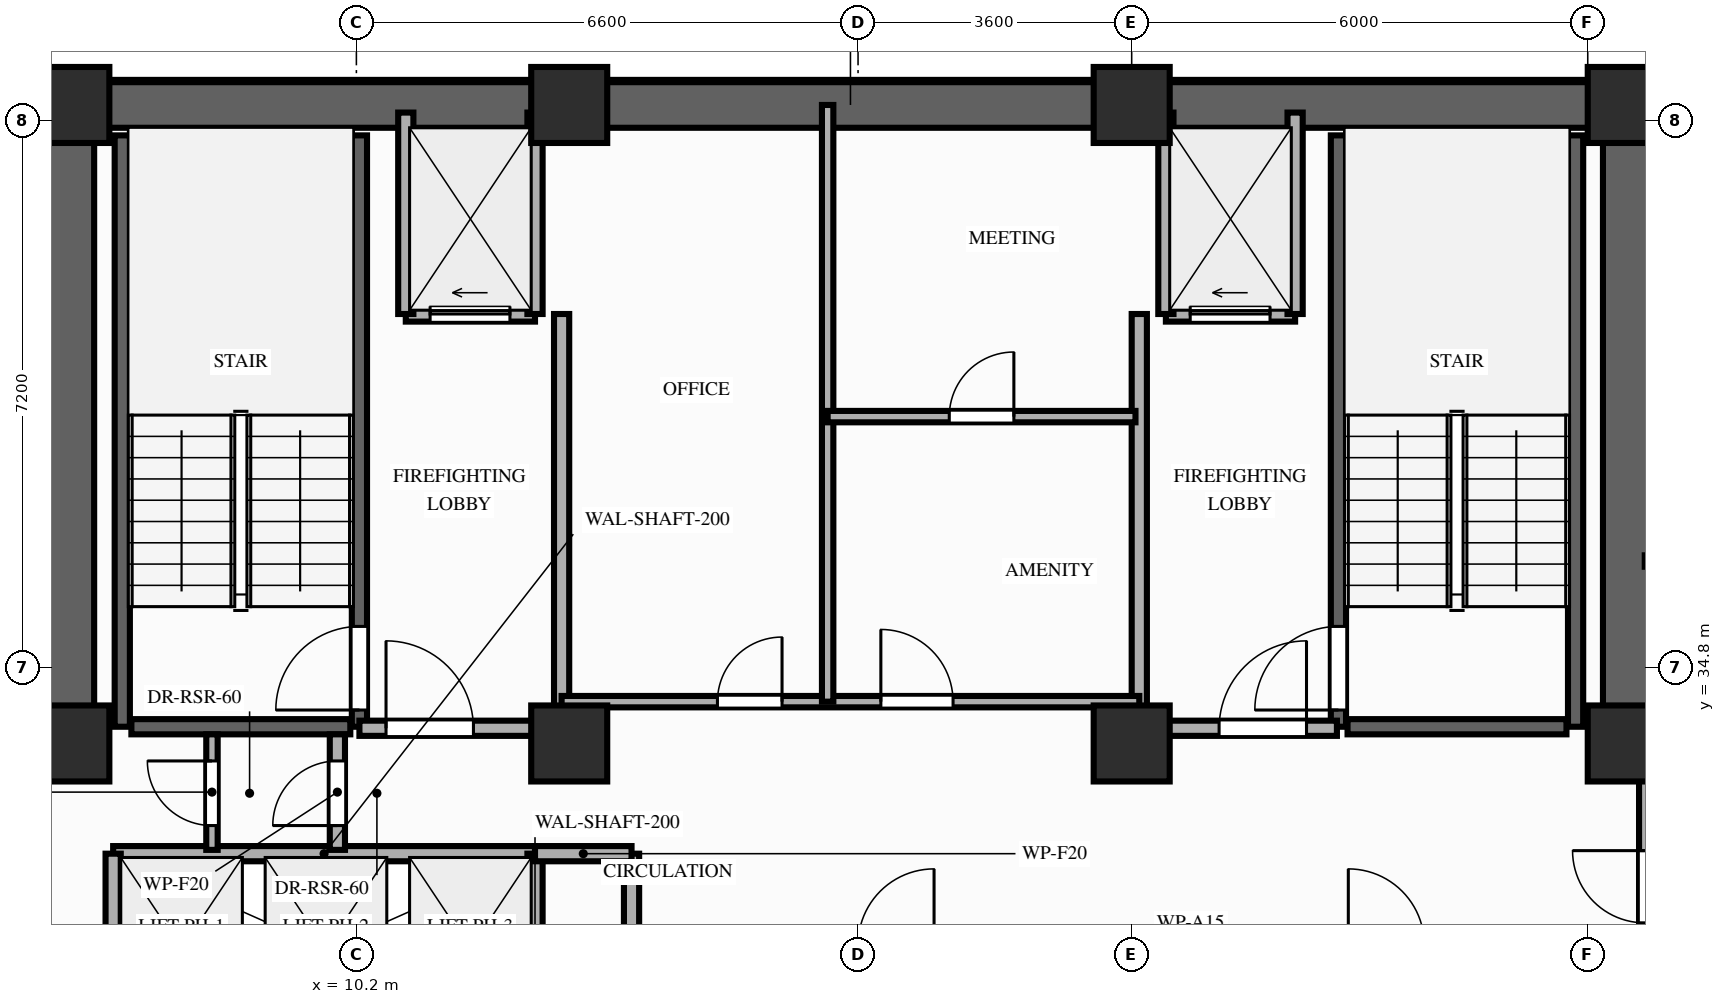
"""IFC4 building model, lengths in metres.
Left out: names, types, materials, properties, quantities, classifications, styles, units other than length and angle.
Written with IfcOpenShell. Run it as: python <this file> out.ifc"""

import sys

from ifc_helpers import new_model, si_unit, direction, frame, frame_2d, origin, origin_2d, place, context, subcontext, project, spatial, rectangle, extrude, element, fill, save


model = new_model("IFC4")
c1 = context("Model", 3, precision=1e-05, world=origin(), true_north=direction((0.0, 1.0)))
c2 = subcontext(c1, "Body", "Model", "MODEL_VIEW")
j1 = project(units=[si_unit("LENGTHUNIT", "METRE"), si_unit("PLANEANGLEUNIT", "RADIAN")], contexts=[c1])
p1 = place(None, origin())
s1 = spatial("IfcSite", under=j1, at=p1, CompositionType="ELEMENT")
p2 = place(p1, origin())
s2 = spatial("IfcBuilding", under=s1, at=p2, CompositionType="ELEMENT")
p3 = place(p2, frame((0.0, 0.0, 163.2)))
s3 = spatial("IfcBuildingStorey", under=s2, at=p3, CompositionType="ELEMENT", Elevation=163.2)
for number, where, z_axis, x_axis in (
    (1, (6.45, 33.8, 0.0), (0.0, 0.0, 1.0), (1.0, 0.0, 0.0)),
    (2, (13.0, 33.8, 0.0), (0.0, 0.0, 1.0), (1.0, 0.0, 0.0)),
    (3, (20.4, 33.8, 0.0), (0.0, 0.0, 1.0), (1.0, 0.0, 0.0)),
    (4, (26.9, 33.8, 0.0), (0.0, 0.0, 1.0), (1.0, 0.0, 0.0)),
    (5, (6.45, 42.2, 0.0), (0.0, 0.0, 1.0), (1.0, 0.0, 0.0)),
    (6, (13.0, 42.2, 0.0), (0.0, 0.0, 1.0), (1.0, 0.0, 0.0)),
    (7, (20.4, 42.2, 0.0), (0.0, 0.0, 1.0), (1.0, 0.0, 0.0)),
    (8, (26.9, 42.2, 0.0), (0.0, 0.0, 1.0), (1.0, 0.0, 0.0)),
):
    element("IfcColumn", number, at=place(p3, frame(where, z_axis=z_axis, x_axis=x_axis)), inside=s3, PredefinedType="COLUMN", context=c2, shape_type="SweptSolid", body=[
        extrude(rectangle(XDim=1.0, YDim=1.0, at=origin_2d()), origin(), (0.0, 0.0, 1.0), 3.2),
    ])
p4 = place(p3, frame((6.45, 42.2, 0.0), z_axis=(0.0, 0.0, 1.0), x_axis=(1.0, 0.0, 0.0)))
e9 = element("IfcWall", 9, at=p4, inside=s3, PredefinedType="SHEAR", context=c2, shape_type="SweptSolid", body=[
    extrude(rectangle(XDim=20.45, YDim=0.6, at=frame_2d((10.225, 0.0))), origin(), (0.0, 0.0, 1.0), 3.02),
])
for number, where, z_axis, x_axis in (
    (10, (6.45, 33.8, 0.0), (0.0, 0.0, 1.0), (0.0, 1.0, 0.0)),
    (11, (26.9, 33.8, 0.0), (0.0, 0.0, 1.0), (0.0, 1.0, 0.0)),
):
    element("IfcWall", number, at=place(p3, frame(where, z_axis=z_axis, x_axis=x_axis)), inside=s3, PredefinedType="SHEAR", context=c2, shape_type="SweptSolid", body=[
        extrude(rectangle(XDim=7.95, YDim=0.6, at=frame_2d((3.975, 0.0))), origin(), (0.0, 0.0, 1.0), 3.02),
    ])
p5 = place(p3, frame((7.12, 34.02, 0.0), z_axis=(0.0, 0.0, 1.0), x_axis=(0.0, 1.0, 0.0)))
e12 = element("IfcWall", 12, at=p5, inside=s3, PredefinedType="SHEAR", context=c2, shape_type="SweptSolid", body=[
    extrude(rectangle(XDim=7.78, YDim=0.2, at=frame_2d((3.89, 0.0))), origin(), (0.0, 0.0, 1.0), 3.02),
])
p6 = place(p3, frame((10.24, 34.02, 0.0), z_axis=(0.0, 0.0, 1.0), x_axis=(0.0, 1.0, 0.0)))
e13 = element("IfcWall", 13, at=p6, inside=s3, PredefinedType="SHEAR", context=c2, shape_type="SweptSolid", body=[
    extrude(rectangle(XDim=7.78, YDim=0.2, at=frame_2d((3.89, 0.0))), origin(), (0.0, 0.0, 1.0), 3.02),
])
p7 = place(p6, frame((0.22, 0.0, 0.0)))
e14 = element("IfcOpeningElement", 14, at=p7, cuts=e13, PredefinedType="OPENING", context=c2, shape_type="SweptSolid", body=[
    extrude(rectangle(XDim=1.1, YDim=2.15, at=frame_2d((0.55, 1.075))), frame((0.0, 0.11, 0.0), z_axis=(0.0, -1.0, 0.0), x_axis=(1.0, 0.0, 0.0)), (0.0, 0.0, 1.0), 0.22),
])
p8 = place(p3, frame((7.24, 34.02, 0.0), z_axis=(0.0, 0.0, 1.0), x_axis=(1.0, 0.0, 0.0)))
e15 = element("IfcWall", 15, at=p8, inside=s3, PredefinedType="SHEAR", context=c2, shape_type="SweptSolid", body=[
    extrude(rectangle(XDim=2.88, YDim=0.2, at=frame_2d((1.44, 0.0))), origin(), (0.0, 0.0, 1.0), 3.02),
])
p9 = place(p3, frame((23.12, 34.02, 0.0), z_axis=(0.0, 0.0, 1.0), x_axis=(0.0, 1.0, 0.0)))
e16 = element("IfcWall", 16, at=p9, inside=s3, PredefinedType="SHEAR", context=c2, shape_type="SweptSolid", body=[
    extrude(rectangle(XDim=7.78, YDim=0.2, at=frame_2d((3.89, 0.0))), origin(), (0.0, 0.0, 1.0), 3.02),
])
p10 = place(p9, frame((0.22, 0.0, 0.0)))
e17 = element("IfcOpeningElement", 17, at=p10, cuts=e16, PredefinedType="OPENING", context=c2, shape_type="SweptSolid", body=[
    extrude(rectangle(XDim=1.1, YDim=2.15, at=frame_2d((0.55, 1.075))), frame((0.0, 0.11, 0.0), z_axis=(0.0, -1.0, 0.0), x_axis=(1.0, 0.0, 0.0)), (0.0, 0.0, 1.0), 0.22),
])
p11 = place(p3, frame((26.24, 34.02, 0.0), z_axis=(0.0, 0.0, 1.0), x_axis=(0.0, 1.0, 0.0)))
e18 = element("IfcWall", 18, at=p11, inside=s3, PredefinedType="SHEAR", context=c2, shape_type="SweptSolid", body=[
    extrude(rectangle(XDim=7.78, YDim=0.2, at=frame_2d((3.89, 0.0))), origin(), (0.0, 0.0, 1.0), 3.02),
])
p12 = place(p3, frame((23.24, 34.02, 0.0), z_axis=(0.0, 0.0, 1.0), x_axis=(1.0, 0.0, 0.0)))
e19 = element("IfcWall", 19, at=p12, inside=s3, PredefinedType="SHEAR", context=c2, shape_type="SweptSolid", body=[
    extrude(rectangle(XDim=2.88, YDim=0.2, at=frame_2d((1.44, 0.0))), origin(), (0.0, 0.0, 1.0), 3.02),
])
p13 = place(p3, frame((7.0, 32.35, 0.0), z_axis=(0.0, 0.0, 1.0), x_axis=(1.0, 0.0, 0.0)))
e20 = element("IfcWall", 20, at=p13, inside=s3, PredefinedType="MOVABLE", context=c2, shape_type="SweptSolid", body=[
    extrude(rectangle(XDim=5.55, YDim=0.2, at=frame_2d((2.775, 0.0))), origin(), (0.0, 0.0, 1.0), 3.02),
])
for number, where, z_axis, x_axis in (
    (21, (7.0, 29.85, 0.0), (0.0, 0.0, 1.0), (0.0, 1.0, 0.0)),
    (22, (12.55, 29.85, 0.0), (0.0, 0.0, 1.0), (0.0, 1.0, 0.0)),
):
    element("IfcWall", number, at=place(p3, frame(where, z_axis=z_axis, x_axis=x_axis)), inside=s3, PredefinedType="MOVABLE", context=c2, shape_type="SweptSolid", body=[
        extrude(rectangle(XDim=2.5, YDim=0.2, at=frame_2d((1.25, 0.0))), origin(), (0.0, 0.0, 1.0), 3.02),
    ])
p14 = place(p3, frame((10.85, 39.45, 0.0), z_axis=(0.0, 0.0, 1.0), x_axis=(1.0, 0.0, 0.0)))
e23 = element("IfcWall", 23, at=p14, inside=s3, PredefinedType="MOVABLE", context=c2, shape_type="SweptSolid", body=[
    extrude(rectangle(XDim=1.7, YDim=0.2, at=frame_2d((0.85, 0.0))), origin(), (0.0, 0.0, 1.0), 3.02),
])
p15 = place(p14, frame((0.32, 0.0, 0.0)))
e24 = element("IfcOpeningElement", 24, at=p15, cuts=e23, PredefinedType="OPENING", context=c2, shape_type="SweptSolid", body=[
    extrude(rectangle(XDim=1.05, YDim=2.15, at=frame_2d((0.525, 1.075))), frame((0.0, 0.11, 0.0), z_axis=(0.0, -1.0, 0.0), x_axis=(1.0, 0.0, 0.0)), (0.0, 0.0, 1.0), 0.22),
])
p16 = place(p3, frame((20.85, 39.45, 0.0), z_axis=(0.0, 0.0, 1.0), x_axis=(1.0, 0.0, 0.0)))
e25 = element("IfcWall", 25, at=p16, inside=s3, PredefinedType="MOVABLE", context=c2, shape_type="SweptSolid", body=[
    extrude(rectangle(XDim=1.7, YDim=0.2, at=frame_2d((0.85, 0.0))), origin(), (0.0, 0.0, 1.0), 3.02),
])
p17 = place(p16, frame((0.32, 0.0, 0.0)))
e26 = element("IfcOpeningElement", 26, at=p17, cuts=e25, PredefinedType="OPENING", context=c2, shape_type="SweptSolid", body=[
    extrude(rectangle(XDim=1.05, YDim=2.15, at=frame_2d((0.525, 1.075))), frame((0.0, 0.11, 0.0), z_axis=(0.0, -1.0, 0.0), x_axis=(1.0, 0.0, 0.0)), (0.0, 0.0, 1.0), 0.22),
])
for number, where, z_axis, x_axis in (
    (27, (10.85, 39.45, 0.0), (0.0, 0.0, 1.0), (0.0, 1.0, 0.0)),
    (28, (12.55, 39.45, 0.0), (0.0, 0.0, 1.0), (0.0, 1.0, 0.0)),
):
    element("IfcWall", number, at=place(p3, frame(where, z_axis=z_axis, x_axis=x_axis)), inside=s3, PredefinedType="MOVABLE", context=c2, shape_type="SweptSolid", body=[
        extrude(rectangle(XDim=2.65, YDim=0.2, at=frame_2d((1.325, 0.0))), origin(), (0.0, 0.0, 1.0), 2.45),
    ])
p18 = place(p3, frame((12.9, 34.0, 0.0), z_axis=(0.0, 0.0, 1.0), x_axis=(0.0, 1.0, 0.0)))
e29 = element("IfcWall", 29, at=p18, inside=s3, PredefinedType="PARTITIONING", context=c2, shape_type="SweptSolid", body=[
    extrude(rectangle(XDim=5.45, YDim=0.2, at=frame_2d((2.725, 0.0))), origin(), (0.0, 0.0, 1.0), 2.45),
])
p19 = place(p3, frame((10.24, 34.0, 0.0), z_axis=(0.0, 0.0, 1.0), x_axis=(1.0, 0.0, 0.0)))
e30 = element("IfcWall", 30, at=p19, inside=s3, PredefinedType="PARTITIONING", context=c2, shape_type="SweptSolid", body=[
    extrude(rectangle(XDim=2.66, YDim=0.2, at=frame_2d((1.33, 0.0))), origin(), (0.0, 0.0, 1.0), 2.45),
])
p20 = place(p19, frame((0.35, 0.0, 0.0)))
e31 = element("IfcOpeningElement", 31, at=p20, cuts=e30, PredefinedType="OPENING", context=c2, shape_type="SweptSolid", body=[
    extrude(rectangle(XDim=1.15, YDim=2.15, at=frame_2d((0.575, 1.075))), frame((0.0, 0.11, 0.0), z_axis=(0.0, -1.0, 0.0), x_axis=(1.0, 0.0, 0.0)), (0.0, 0.0, 1.0), 0.22),
])
for number, where, z_axis, x_axis in (
    (32, (20.85, 39.45, 0.0), (0.0, 0.0, 1.0), (0.0, 1.0, 0.0)),
    (33, (22.55, 39.45, 0.0), (0.0, 0.0, 1.0), (0.0, 1.0, 0.0)),
):
    element("IfcWall", number, at=place(p3, frame(where, z_axis=z_axis, x_axis=x_axis)), inside=s3, PredefinedType="MOVABLE", context=c2, shape_type="SweptSolid", body=[
        extrude(rectangle(XDim=2.65, YDim=0.2, at=frame_2d((1.325, 0.0))), origin(), (0.0, 0.0, 1.0), 2.45),
    ])
p21 = place(p3, frame((20.5, 34.0, 0.0), z_axis=(0.0, 0.0, 1.0), x_axis=(0.0, 1.0, 0.0)))
e34 = element("IfcWall", 34, at=p21, inside=s3, PredefinedType="PARTITIONING", context=c2, shape_type="SweptSolid", body=[
    extrude(rectangle(XDim=5.45, YDim=0.2, at=frame_2d((2.725, 0.0))), origin(), (0.0, 0.0, 1.0), 2.45),
])
p22 = place(p3, frame((20.5, 34.0, 0.0), z_axis=(0.0, 0.0, 1.0), x_axis=(1.0, 0.0, 0.0)))
e35 = element("IfcWall", 35, at=p22, inside=s3, PredefinedType="PARTITIONING", context=c2, shape_type="SweptSolid", body=[
    extrude(rectangle(XDim=2.6, YDim=0.2, at=frame_2d((1.3, 0.0))), origin(), (0.0, 0.0, 1.0), 2.45),
])
p23 = place(p22, frame((1.05, 0.0, 0.0)))
e36 = element("IfcOpeningElement", 36, at=p23, cuts=e35, PredefinedType="OPENING", context=c2, shape_type="SweptSolid", body=[
    extrude(rectangle(XDim=1.15, YDim=2.15, at=frame_2d((0.575, 1.075))), frame((0.0, 0.11, 0.0), z_axis=(0.0, -1.0, 0.0), x_axis=(1.0, 0.0, 0.0)), (0.0, 0.0, 1.0), 0.22),
])
p24 = place(p3, frame((9.95, 32.4, 0.0), z_axis=(0.0, 0.0, 1.0), x_axis=(0.0, 1.0, 0.0)))
e37 = element("IfcWall", 37, at=p24, inside=s3, PredefinedType="PARTITIONING", context=c2, shape_type="SweptSolid", body=[
    extrude(rectangle(XDim=1.52, YDim=0.2, at=frame_2d((0.76, 0.0))), origin(), (0.0, 0.0, 1.0), 2.45),
])
p25 = place(p24, frame((0.32, 0.0, 0.0)))
e38 = element("IfcOpeningElement", 38, at=p25, cuts=e37, PredefinedType="OPENING", context=c2, shape_type="SweptSolid", body=[
    extrude(rectangle(XDim=0.85, YDim=2.05, at=frame_2d((0.425, 1.025))), frame((0.0, 0.11, 0.0), z_axis=(0.0, -1.0, 0.0), x_axis=(1.0, 0.0, 0.0)), (0.0, 0.0, 1.0), 0.22),
])
p26 = place(p3, frame((8.3, 32.4, 0.0), z_axis=(0.0, 0.0, 1.0), x_axis=(0.0, 1.0, 0.0)))
e39 = element("IfcWall", 39, at=p26, inside=s3, PredefinedType="PARTITIONING", context=c2, shape_type="SweptSolid", body=[
    extrude(rectangle(XDim=1.52, YDim=0.15, at=frame_2d((0.76, 0.0))), origin(), (0.0, 0.0, 1.0), 2.45),
])
p27 = place(p26, frame((0.32, 0.0, 0.0)))
e40 = element("IfcOpeningElement", 40, at=p27, cuts=e39, PredefinedType="OPENING", context=c2, shape_type="SweptSolid", body=[
    extrude(rectangle(XDim=0.85, YDim=2.05, at=frame_2d((0.425, 1.025))), frame((0.0, 0.085, 0.0), z_axis=(0.0, -1.0, 0.0), x_axis=(1.0, 0.0, 0.0)), (0.0, 0.0, 1.0), 0.17),
])
p28 = place(p3, frame((13.82, 29.85, 0.0), z_axis=(0.0, 0.0, 1.0), x_axis=(0.0, 1.0, 0.0)))
e41 = element("IfcWall", 41, at=p28, inside=s3, PredefinedType="PARTITIONING", context=c2, shape_type="SweptSolid", body=[
    extrude(rectangle(XDim=2.5, YDim=0.2, at=frame_2d((1.25, 0.0))), origin(), (0.0, 0.0, 1.0), 3.02),
])
p29 = place(p3, frame((12.55, 32.35, 0.0), z_axis=(0.0, 0.0, 1.0), x_axis=(1.0, 0.0, 0.0)))
e42 = element("IfcWall", 42, at=p29, inside=s3, PredefinedType="PARTITIONING", context=c2, shape_type="SweptSolid", body=[
    extrude(rectangle(XDim=1.27, YDim=0.2, at=frame_2d((0.635, 0.0))), origin(), (0.0, 0.0, 1.0), 3.02),
])
p30 = place(p3, frame((12.9, 34.35, 0.0), z_axis=(0.0, 0.0, 1.0), x_axis=(1.0, 0.0, 0.0)))
e43 = element("IfcWall", 43, at=p30, inside=s3, PredefinedType="PARTITIONING", context=c2, shape_type="SweptSolid", body=[
    extrude(rectangle(XDim=7.6, YDim=0.15, at=frame_2d((3.8, 0.0))), origin(), (0.0, 0.0, 1.0), 3.02),
])
p31 = place(p30, frame((2.05, 0.0, 0.0)))
e44 = element("IfcOpeningElement", 44, at=p31, cuts=e43, PredefinedType="OPENING", context=c2, shape_type="SweptSolid", body=[
    extrude(rectangle(XDim=0.85, YDim=2.05, at=frame_2d((0.425, 1.025))), frame((0.0, 0.085, 0.0), z_axis=(0.0, -1.0, 0.0), x_axis=(1.0, 0.0, 0.0)), (0.0, 0.0, 1.0), 0.17),
])
p32 = place(p30, frame((4.2, 0.0, 0.0)))
e45 = element("IfcOpeningElement", 45, at=p32, cuts=e43, PredefinedType="OPENING", context=c2, shape_type="SweptSolid", body=[
    extrude(rectangle(XDim=0.95, YDim=2.15, at=frame_2d((0.475, 1.075))), frame((0.0, 0.085, 0.0), z_axis=(0.0, -1.0, 0.0), x_axis=(1.0, 0.0, 0.0)), (0.0, 0.0, 1.0), 0.17),
])
p33 = place(p3, frame((16.4, 34.35, 0.0), z_axis=(0.0, 0.0, 1.0), x_axis=(0.0, 1.0, 0.0)))
e46 = element("IfcWall", 46, at=p33, inside=s3, PredefinedType="PARTITIONING", context=c2, shape_type="SweptSolid", body=[
    extrude(rectangle(XDim=7.85, YDim=0.15, at=frame_2d((3.925, 0.0))), origin(), (0.0, 0.0, 1.0), 2.45),
])
p34 = place(p3, frame((16.4, 38.1, 0.0), z_axis=(0.0, 0.0, 1.0), x_axis=(1.0, 0.0, 0.0)))
e47 = element("IfcWall", 47, at=p34, inside=s3, PredefinedType="PARTITIONING", context=c2, shape_type="SweptSolid", body=[
    extrude(rectangle(XDim=4.05, YDim=0.15, at=frame_2d((2.025, 0.0))), origin(), (0.0, 0.0, 1.0), 3.02),
])
p35 = place(p34, frame((1.6, 0.0, 0.0)))
e48 = element("IfcOpeningElement", 48, at=p35, cuts=e47, PredefinedType="OPENING", context=c2, shape_type="SweptSolid", body=[
    extrude(rectangle(XDim=0.85, YDim=2.05, at=frame_2d((0.425, 1.025))), frame((0.0, 0.085, 0.0), z_axis=(0.0, -1.0, 0.0), x_axis=(1.0, 0.0, 0.0)), (0.0, 0.0, 1.0), 0.17),
])
p36 = place(p3, frame((27.15, 26.75, 0.0), z_axis=(0.0, 0.0, 1.0), x_axis=(0.0, 1.0, 0.0)))
e49 = element("IfcWall", 49, at=p36, inside=s3, PredefinedType="PARTITIONING", context=c2, shape_type="SweptSolid", body=[
    extrude(rectangle(XDim=6.93, YDim=0.15, at=frame_2d((3.465, 0.0))), origin(), (0.0, 0.0, 1.0), 2.45),
])
p37 = place(p36, frame((4.69, 0.0, 0.0)))
e50 = element("IfcOpeningElement", 50, at=p37, cuts=e49, PredefinedType="OPENING", context=c2, shape_type="SweptSolid", body=[
    extrude(rectangle(XDim=0.95, YDim=2.15, at=frame_2d((0.475, 1.075))), frame((0.0, 0.085, 0.0), z_axis=(0.0, -1.0, 0.0), x_axis=(1.0, 0.0, 0.0)), (0.0, 0.0, 1.0), 0.17),
])
p38 = place(p3, frame((27.15, 36.2, 0.0), z_axis=(0.0, 0.0, 1.0), x_axis=(1.0, 0.0, 0.0)))
e51 = element("IfcWall", 51, at=p38, inside=s3, PredefinedType="PARTITIONING", context=c2, shape_type="SweptSolid", body=[
    extrude(rectangle(XDim=3.7, YDim=0.15, at=frame_2d((1.85, 0.0))), origin(), (0.0, 0.0, 1.0), 2.45),
])
p39 = place(p38, frame((1.2, 0.0, 0.0)))
e52 = element("IfcOpeningElement", 52, at=p39, cuts=e51, PredefinedType="OPENING", context=c2, shape_type="SweptSolid", body=[
    extrude(rectangle(XDim=0.95, YDim=2.15, at=frame_2d((0.475, 1.075))), frame((0.0, 0.085, 0.0), z_axis=(0.0, -1.0, 0.0), x_axis=(1.0, 0.0, 0.0)), (0.0, 0.0, 1.0), 0.17),
])
p40 = place(p7, origin())
e53 = element("IfcDoor", 53, at=p40, inside=s3, OperationType="SINGLE_SWING_LEFT", PredefinedType="DOOR", context=c2, shape_type="SweptSolid", body=[
    extrude(rectangle(XDim=1.1, YDim=2.15, at=frame_2d((0.55, 1.075))), frame((0.0, 0.025, 0.0), z_axis=(0.0, -1.0, 0.0), x_axis=(1.0, 0.0, 0.0)), (0.0, 0.0, 1.0), 0.05),
])
fill(e14, e53)
p41 = place(p10, origin())
e54 = element("IfcDoor", 54, at=p41, inside=s3, OperationType="SINGLE_SWING_LEFT", PredefinedType="DOOR", context=c2, shape_type="SweptSolid", body=[
    extrude(rectangle(XDim=1.1, YDim=2.15, at=frame_2d((0.55, 1.075))), frame((0.0, 0.025, 0.0), z_axis=(0.0, -1.0, 0.0), x_axis=(1.0, 0.0, 0.0)), (0.0, 0.0, 1.0), 0.05),
])
fill(e17, e54)
p42 = place(p15, origin())
e55 = element("IfcDoor", 55, at=p42, inside=s3, OperationType="SLIDING_TO_LEFT", PredefinedType="DOOR", context=c2, shape_type="SweptSolid", body=[
    extrude(rectangle(XDim=1.05, YDim=2.15, at=frame_2d((0.525, 1.075))), frame((0.0, 0.025, 0.0), z_axis=(0.0, -1.0, 0.0), x_axis=(1.0, 0.0, 0.0)), (0.0, 0.0, 1.0), 0.05),
])
fill(e24, e55)
p43 = place(p17, origin())
e56 = element("IfcDoor", 56, at=p43, inside=s3, OperationType="SLIDING_TO_LEFT", PredefinedType="DOOR", context=c2, shape_type="SweptSolid", body=[
    extrude(rectangle(XDim=1.05, YDim=2.15, at=frame_2d((0.525, 1.075))), frame((0.0, 0.025, 0.0), z_axis=(0.0, -1.0, 0.0), x_axis=(1.0, 0.0, 0.0)), (0.0, 0.0, 1.0), 0.05),
])
fill(e26, e56)
p44 = place(p20, origin())
e57 = element("IfcDoor", 57, at=p44, inside=s3, OperationType="SINGLE_SWING_LEFT", PredefinedType="DOOR", context=c2, shape_type="SweptSolid", body=[
    extrude(rectangle(XDim=1.15, YDim=2.15, at=frame_2d((0.575, 1.075))), frame((0.0, 0.025, 0.0), z_axis=(0.0, -1.0, 0.0), x_axis=(1.0, 0.0, 0.0)), (0.0, 0.0, 1.0), 0.05),
])
fill(e31, e57)
p45 = place(p23, origin())
e58 = element("IfcDoor", 58, at=p45, inside=s3, OperationType="SINGLE_SWING_RIGHT", PredefinedType="DOOR", context=c2, shape_type="SweptSolid", body=[
    extrude(rectangle(XDim=1.15, YDim=2.15, at=frame_2d((0.575, 1.075))), frame((0.0, 0.025, 0.0), z_axis=(0.0, -1.0, 0.0), x_axis=(1.0, 0.0, 0.0)), (0.0, 0.0, 1.0), 0.05),
])
fill(e36, e58)
p46 = place(p25, origin())
e59 = element("IfcDoor", 59, at=p46, inside=s3, OperationType="SINGLE_SWING_LEFT", PredefinedType="DOOR", context=c2, shape_type="SweptSolid", body=[
    extrude(rectangle(XDim=0.85, YDim=2.05, at=frame_2d((0.425, 1.025))), frame((0.0, 0.025, 0.0), z_axis=(0.0, -1.0, 0.0), x_axis=(1.0, 0.0, 0.0)), (0.0, 0.0, 1.0), 0.05),
])
fill(e38, e59)
p47 = place(p27, origin())
e60 = element("IfcDoor", 60, at=p47, inside=s3, OperationType="SINGLE_SWING_RIGHT", PredefinedType="DOOR", context=c2, shape_type="SweptSolid", body=[
    extrude(rectangle(XDim=0.85, YDim=2.05, at=frame_2d((0.425, 1.025))), frame((0.0, 0.025, 0.0), z_axis=(0.0, -1.0, 0.0), x_axis=(1.0, 0.0, 0.0)), (0.0, 0.0, 1.0), 0.05),
])
fill(e40, e60)
p48 = place(p31, origin())
e61 = element("IfcDoor", 61, at=p48, inside=s3, OperationType="SINGLE_SWING_RIGHT", PredefinedType="DOOR", context=c2, shape_type="SweptSolid", body=[
    extrude(rectangle(XDim=0.85, YDim=2.05, at=frame_2d((0.425, 1.025))), frame((0.0, 0.025, 0.0), z_axis=(0.0, -1.0, 0.0), x_axis=(1.0, 0.0, 0.0)), (0.0, 0.0, 1.0), 0.05),
])
fill(e44, e61)
p49 = place(p32, origin())
e62 = element("IfcDoor", 62, at=p49, inside=s3, OperationType="SINGLE_SWING_LEFT", PredefinedType="DOOR", context=c2, shape_type="SweptSolid", body=[
    extrude(rectangle(XDim=0.95, YDim=2.15, at=frame_2d((0.475, 1.075))), frame((0.0, 0.025, 0.0), z_axis=(0.0, -1.0, 0.0), x_axis=(1.0, 0.0, 0.0)), (0.0, 0.0, 1.0), 0.05),
])
fill(e45, e62)
p50 = place(p35, origin())
e63 = element("IfcDoor", 63, at=p50, inside=s3, OperationType="SINGLE_SWING_RIGHT", PredefinedType="DOOR", context=c2, shape_type="SweptSolid", body=[
    extrude(rectangle(XDim=0.85, YDim=2.05, at=frame_2d((0.425, 1.025))), frame((0.0, 0.025, 0.0), z_axis=(0.0, -1.0, 0.0), x_axis=(1.0, 0.0, 0.0)), (0.0, 0.0, 1.0), 0.05),
])
fill(e48, e63)
p51 = place(p37, origin())
e64 = element("IfcDoor", 64, at=p51, inside=s3, OperationType="SINGLE_SWING_RIGHT", PredefinedType="DOOR", context=c2, shape_type="SweptSolid", body=[
    extrude(rectangle(XDim=0.95, YDim=2.15, at=frame_2d((0.475, 1.075))), frame((0.0, 0.025, 0.0), z_axis=(0.0, -1.0, 0.0), x_axis=(1.0, 0.0, 0.0)), (0.0, 0.0, 1.0), 0.05),
])
fill(e50, e64)
save(model, sys.argv[1])
